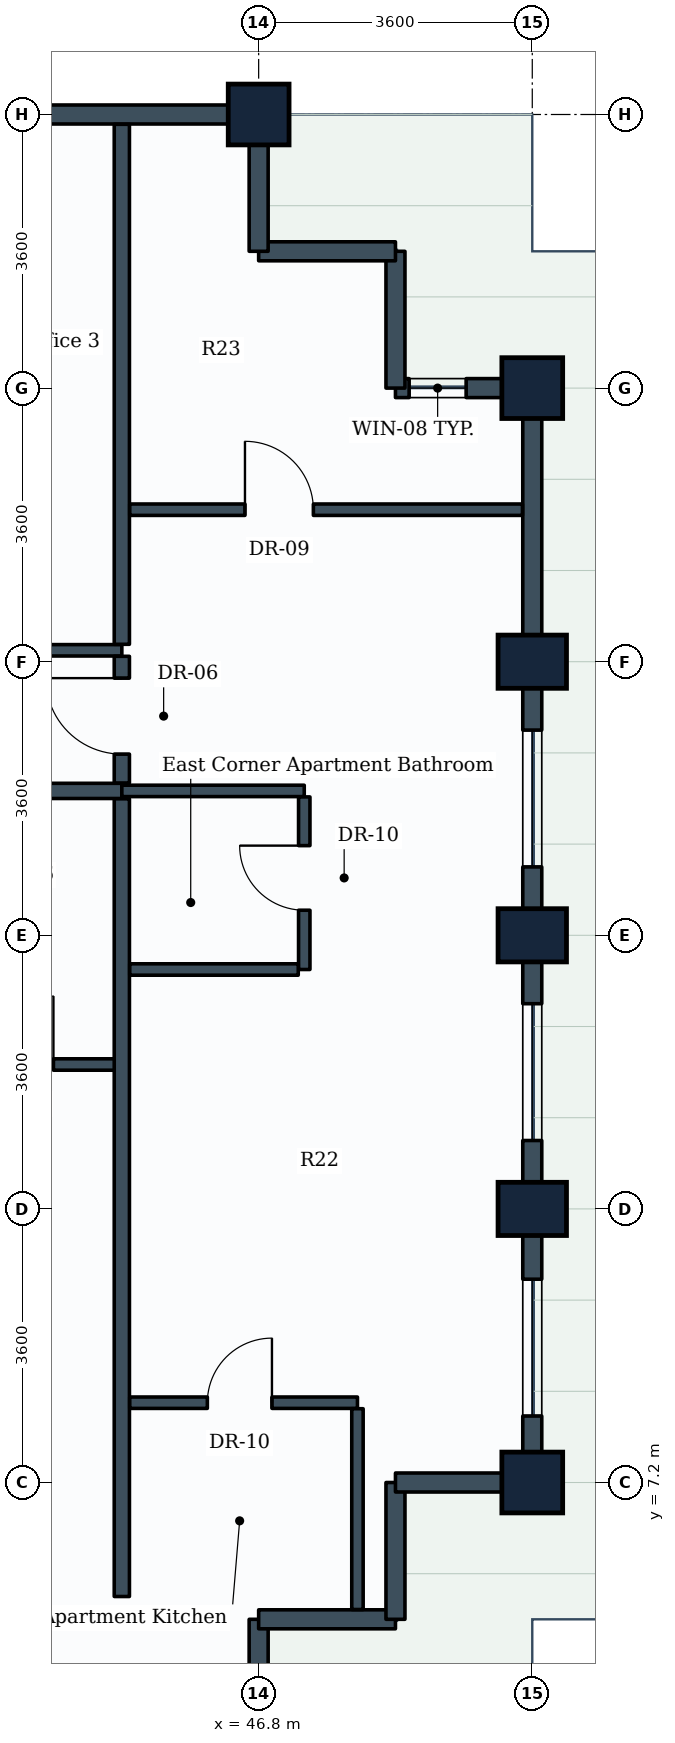
"""IFC4 building model, lengths in metres.
Left out: names, types, materials, properties, quantities, classifications, styles, units other than length and angle.
Written with IfcOpenShell. Run it as: python <this file> out.ifc"""

import sys

from ifc_helpers import new_model, si_unit, direction, frame, frame_2d, origin, origin_2d, place, context, subcontext, project, spatial, rectangle, extrude, element, fill, save


model = new_model("IFC4")
c1 = context("Model", 3, precision=1e-05, world=origin(), true_north=direction((0.0, 1.0)))
c2 = subcontext(c1, "Body", "Model", "MODEL_VIEW")
j1 = project(units=[si_unit("LENGTHUNIT", "METRE"), si_unit("PLANEANGLEUNIT", "RADIAN")], contexts=[c1])
p1 = place(None, origin())
s1 = spatial("IfcSite", under=j1, at=p1, CompositionType="ELEMENT")
p2 = place(p1, origin())
s2 = spatial("IfcBuilding", under=s1, at=p2, CompositionType="ELEMENT")
p3 = place(p2, frame((0.0, 0.0, 174.8)))
s3 = spatial("IfcBuildingStorey", under=s2, at=p3, CompositionType="ELEMENT", Elevation=174.8)
for number, where, z_axis, x_axis in (
    (1, (46.8, 25.2, 0.0), (0.0, 0.0, 1.0), (1.0, 0.0, 0.0)),
    (2, (50.4, 7.2, 0.0), (0.0, 0.0, 1.0), (1.0, 0.0, 0.0)),
):
    element("IfcColumn", number, at=place(p3, frame(where, z_axis=z_axis, x_axis=x_axis)), inside=s3, PredefinedType="COLUMN", context=c2, shape_type="SweptSolid", body=[
        extrude(rectangle(XDim=0.8, YDim=0.8, at=origin_2d()), origin(), (0.0, 0.0, 1.0), 3.8),
    ])
for number, where, z_axis, x_axis in (
    (3, (50.4, 10.8, 0.0), (0.0, 0.0, 1.0), (0.0, 1.0, 0.0)),
    (4, (50.4, 14.4, 0.0), (0.0, 0.0, 1.0), (0.0, 1.0, 0.0)),
    (5, (50.4, 18.0, 0.0), (0.0, 0.0, 1.0), (0.0, 1.0, 0.0)),
):
    element("IfcColumn", number, at=place(p3, frame(where, z_axis=z_axis, x_axis=x_axis)), inside=s3, PredefinedType="COLUMN", context=c2, shape_type="SweptSolid", body=[
        extrude(rectangle(XDim=0.7, YDim=0.9, at=origin_2d()), origin(), (0.0, 0.0, 1.0), 3.8),
    ])
p4 = place(p3, frame((50.4, 21.6, 0.0), z_axis=(0.0, 0.0, 1.0), x_axis=(0.0, 1.0, 0.0)))
e6 = element("IfcColumn", 6, at=p4, inside=s3, PredefinedType="COLUMN", context=c2, shape_type="SweptSolid", body=[
    extrude(rectangle(XDim=0.8, YDim=0.8, at=origin_2d()), origin(), (0.0, 0.0, 1.0), 3.8),
])
p5 = place(p3, frame((46.8, 5.4, 0.0), z_axis=(0.0, 0.0, 1.0), x_axis=(0.0, -1.0, 0.0)))
e7 = element("IfcWall", 7, at=p5, inside=s3, PredefinedType="STANDARD", context=c2, shape_type="SweptSolid", body=[
    extrude(rectangle(XDim=1.8, YDim=0.25, at=frame_2d((0.9, 0.0))), origin(), (0.0, 0.0, 1.0), 2.93),
])
for number, where, z_axis, x_axis in (
    (8, (48.6, 5.4, 0.0), (0.0, 0.0, 1.0), (-1.0, 0.0, 0.0)),
    (9, (48.6, 7.2, 0.0), (0.0, 0.0, 1.0), (0.0, -1.0, 0.0)),
):
    element("IfcWall", number, at=place(p3, frame(where, z_axis=z_axis, x_axis=x_axis)), inside=s3, PredefinedType="STANDARD", context=c2, shape_type="SweptSolid", body=[
        extrude(rectangle(XDim=1.8, YDim=0.25, at=frame_2d((0.9, 0.0))), origin(), (0.0, 0.0, 1.0), 3.535),
    ])
p6 = place(p3, frame((50.4, 7.2, 0.0), z_axis=(0.0, 0.0, 1.0), x_axis=(-1.0, 0.0, 0.0)))
e10 = element("IfcWall", 10, at=p6, inside=s3, PredefinedType="STANDARD", context=c2, shape_type="SweptSolid", body=[
    extrude(rectangle(XDim=1.8, YDim=0.25, at=frame_2d((0.9, 0.0))), origin(), (0.0, 0.0, 1.0), 2.93),
])
p7 = place(p3, frame((50.4, 10.8, 0.0), z_axis=(0.0, 0.0, 1.0), x_axis=(0.0, -1.0, 0.0)))
e11 = element("IfcWall", 11, at=p7, inside=s3, PredefinedType="STANDARD", context=c2, shape_type="SweptSolid", body=[
    extrude(rectangle(XDim=3.6, YDim=0.25, at=frame_2d((1.8, 0.0))), origin(), (0.0, 0.0, 1.0), 2.93),
])
p8 = place(p7, frame((0.925, 0.0, 0.85)))
e12 = element("IfcOpeningElement", 12, at=p8, cuts=e11, PredefinedType="OPENING", context=c2, shape_type="SweptSolid", body=[
    extrude(rectangle(XDim=1.8, YDim=1.35, at=frame_2d((0.9, 0.675))), frame((0.0, 0.135, 0.0), z_axis=(0.0, -1.0, 0.0), x_axis=(1.0, 0.0, 0.0)), (0.0, 0.0, 1.0), 0.27),
])
p9 = place(p3, frame((50.4, 14.4, 0.0), z_axis=(0.0, 0.0, 1.0), x_axis=(0.0, -1.0, 0.0)))
e13 = element("IfcWall", 13, at=p9, inside=s3, PredefinedType="STANDARD", context=c2, shape_type="SweptSolid", body=[
    extrude(rectangle(XDim=3.6, YDim=0.25, at=frame_2d((1.8, 0.0))), origin(), (0.0, 0.0, 1.0), 2.93),
])
p10 = place(p9, frame((0.9, 0.0, 0.85)))
e14 = element("IfcOpeningElement", 14, at=p10, cuts=e13, PredefinedType="OPENING", context=c2, shape_type="SweptSolid", body=[
    extrude(rectangle(XDim=1.8, YDim=1.35, at=frame_2d((0.9, 0.675))), frame((0.0, 0.135, 0.0), z_axis=(0.0, -1.0, 0.0), x_axis=(1.0, 0.0, 0.0)), (0.0, 0.0, 1.0), 0.27),
])
p11 = place(p3, frame((50.4, 18.0, 0.0), z_axis=(0.0, 0.0, 1.0), x_axis=(0.0, -1.0, 0.0)))
e15 = element("IfcWall", 15, at=p11, inside=s3, PredefinedType="STANDARD", context=c2, shape_type="SweptSolid", body=[
    extrude(rectangle(XDim=3.6, YDim=0.25, at=frame_2d((1.8, 0.0))), origin(), (0.0, 0.0, 1.0), 2.93),
])
p12 = place(p11, frame((0.9, 0.0, 0.85)))
e16 = element("IfcOpeningElement", 16, at=p12, cuts=e15, PredefinedType="OPENING", context=c2, shape_type="SweptSolid", body=[
    extrude(rectangle(XDim=1.8, YDim=1.35, at=frame_2d((0.9, 0.675))), frame((0.0, 0.135, 0.0), z_axis=(0.0, -1.0, 0.0), x_axis=(1.0, 0.0, 0.0)), (0.0, 0.0, 1.0), 0.27),
])
p13 = place(p3, frame((50.4, 21.6, 0.0), z_axis=(0.0, 0.0, 1.0), x_axis=(0.0, -1.0, 0.0)))
e17 = element("IfcWall", 17, at=p13, inside=s3, PredefinedType="STANDARD", context=c2, shape_type="SweptSolid", body=[
    extrude(rectangle(XDim=3.6, YDim=0.25, at=frame_2d((1.8, 0.0))), origin(), (0.0, 0.0, 1.0), 2.93),
])
p14 = place(p3, frame((48.6, 21.6, 0.0), z_axis=(0.0, 0.0, 1.0), x_axis=(1.0, 0.0, 0.0)))
e18 = element("IfcWall", 18, at=p14, inside=s3, PredefinedType="STANDARD", context=c2, shape_type="SweptSolid", body=[
    extrude(rectangle(XDim=1.8, YDim=0.25, at=frame_2d((0.9, 0.0))), origin(), (0.0, 0.0, 1.0), 2.93),
])
p15 = place(p14, frame((0.18, 0.0, 0.85)))
e19 = element("IfcOpeningElement", 19, at=p15, cuts=e18, PredefinedType="OPENING", context=c2, shape_type="SweptSolid", body=[
    extrude(rectangle(XDim=0.75, YDim=1.05, at=frame_2d((0.375, 0.525))), frame((0.0, 0.135, 0.0), z_axis=(0.0, -1.0, 0.0), x_axis=(1.0, 0.0, 0.0)), (0.0, 0.0, 1.0), 0.27),
])
p16 = place(p3, frame((48.6, 23.4, 0.0), z_axis=(0.0, 0.0, 1.0), x_axis=(0.0, -1.0, 0.0)))
e20 = element("IfcWall", 20, at=p16, inside=s3, PredefinedType="STANDARD", context=c2, shape_type="SweptSolid", body=[
    extrude(rectangle(XDim=1.8, YDim=0.25, at=frame_2d((0.9, 0.0))), origin(), (0.0, 0.0, 1.0), 3.535),
])
p17 = place(p3, frame((46.8, 23.4, 0.0), z_axis=(0.0, 0.0, 1.0), x_axis=(1.0, 0.0, 0.0)))
e21 = element("IfcWall", 21, at=p17, inside=s3, PredefinedType="STANDARD", context=c2, shape_type="SweptSolid", body=[
    extrude(rectangle(XDim=1.8, YDim=0.25, at=frame_2d((0.9, 0.0))), origin(), (0.0, 0.0, 1.0), 3.535),
])
p18 = place(p3, frame((46.8, 25.2, 0.0), z_axis=(0.0, 0.0, 1.0), x_axis=(0.0, -1.0, 0.0)))
e22 = element("IfcWall", 22, at=p18, inside=s3, PredefinedType="STANDARD", context=c2, shape_type="SweptSolid", body=[
    extrude(rectangle(XDim=1.8, YDim=0.25, at=frame_2d((0.9, 0.0))), origin(), (0.0, 0.0, 1.0), 2.93),
])
p19 = place(p3, frame((43.2, 25.2, 0.0), z_axis=(0.0, 0.0, 1.0), x_axis=(1.0, 0.0, 0.0)))
e23 = element("IfcWall", 23, at=p19, inside=s3, PredefinedType="STANDARD", context=c2, shape_type="SweptSolid", body=[
    extrude(rectangle(XDim=3.6, YDim=0.25, at=frame_2d((1.8, 0.0))), origin(), (0.0, 0.0, 1.0), 2.93),
])
p20 = place(p3, frame((41.68, 16.3, 0.0), z_axis=(0.0, 0.0, 1.0), x_axis=(1.0, 0.0, 0.0)))
e24 = element("IfcWall", 24, at=p20, inside=s3, PredefinedType="PARTITIONING", context=c2, shape_type="SweptSolid", body=[
    extrude(rectangle(XDim=3.32, YDim=0.2, at=frame_2d((1.66, 0.0))), origin(), (0.0, 0.0, 1.0), 3.18),
])
p21 = place(p20, frame((1.199, 0.0, 0.0)))
e25 = element("IfcOpeningElement", 25, at=p21, cuts=e24, PredefinedType="OPENING", context=c2, shape_type="SweptSolid", body=[
    extrude(rectangle(XDim=1.0, YDim=2.1, at=frame_2d((0.5, 1.05))), frame((0.0, 0.11, 0.0), z_axis=(0.0, -1.0, 0.0), x_axis=(1.0, 0.0, 0.0)), (0.0, 0.0, 1.0), 0.22),
])
p22 = place(p3, frame((42.38, 12.7, 0.0), z_axis=(0.0, 0.0, 1.0), x_axis=(1.0, 0.0, 0.0)))
e26 = element("IfcWall", 26, at=p22, inside=s3, PredefinedType="PARTITIONING", context=c2, shape_type="SweptSolid", body=[
    extrude(rectangle(XDim=2.62, YDim=0.15, at=frame_2d((1.31, 0.0))), origin(), (0.0, 0.0, 1.0), 3.18),
])
p23 = place(p22, frame((0.82, 0.0, 0.0)))
e27 = element("IfcOpeningElement", 27, at=p23, cuts=e26, PredefinedType="OPENING", context=c2, shape_type="SweptSolid", body=[
    extrude(rectangle(XDim=0.9, YDim=2.1, at=frame_2d((0.45, 1.05))), frame((0.0, 0.085, 0.0), z_axis=(0.0, -1.0, 0.0), x_axis=(1.0, 0.0, 0.0)), (0.0, 0.0, 1.0), 0.17),
])
p24 = place(p3, frame((39.0, 18.15, 0.0), z_axis=(0.0, 0.0, 1.0), x_axis=(1.0, 0.0, 0.0)))
e28 = element("IfcWall", 28, at=p24, inside=s3, PredefinedType="PARTITIONING", context=c2, shape_type="SweptSolid", body=[
    extrude(rectangle(XDim=6.0, YDim=0.15, at=frame_2d((3.0, 0.0))), origin(), (0.0, 0.0, 1.0), 3.17),
])
p25 = place(p24, frame((2.5, 0.0, 0.0)))
e29 = element("IfcOpeningElement", 29, at=p25, cuts=e28, PredefinedType="OPENING", context=c2, shape_type="SweptSolid", body=[
    extrude(rectangle(XDim=1.0, YDim=2.1, at=frame_2d((0.5, 1.05))), frame((0.0, 0.085, 0.0), z_axis=(0.0, -1.0, 0.0), x_axis=(1.0, 0.0, 0.0)), (0.0, 0.0, 1.0), 0.17),
])
p26 = place(p3, frame((45.0, 5.7, 0.0), z_axis=(0.0, 0.0, 1.0), x_axis=(0.0, 1.0, 0.0)))
e30 = element("IfcWall", 30, at=p26, inside=s3, PredefinedType="PARTITIONING", context=c2, shape_type="SweptSolid", body=[
    extrude(rectangle(XDim=10.496, YDim=0.2, at=frame_2d((5.248, 0.0))), origin(), (0.0, 0.0, 1.0), 3.17),
])
p27 = place(p3, frame((45.0, 18.229, 0.0), z_axis=(0.0, 0.0, 1.0), x_axis=(0.0, 1.0, 0.0)))
e31 = element("IfcWall", 31, at=p27, inside=s3, PredefinedType="PARTITIONING", context=c2, shape_type="SweptSolid", body=[
    extrude(rectangle(XDim=6.842, YDim=0.2, at=frame_2d((3.421, 0.0))), origin(), (0.0, 0.0, 1.0), 2.93),
])
p28 = place(p3, frame((45.0, 16.404, 0.0), z_axis=(0.0, 0.0, 1.0), x_axis=(0.0, 1.0, 0.0)))
e32 = element("IfcWall", 32, at=p28, inside=s3, PredefinedType="PARTITIONING", context=c2, shape_type="SweptSolid", body=[
    extrude(rectangle(XDim=1.667, YDim=0.2, at=frame_2d((0.833, 0.0))), origin(), (0.0, 0.0, 1.0), 3.535),
])
p29 = place(p28, frame((0.38, 0.0, 0.0)))
e33 = element("IfcOpeningElement", 33, at=p29, cuts=e32, PredefinedType="OPENING", context=c2, shape_type="SweptSolid", body=[
    extrude(rectangle(XDim=1.0, YDim=2.1, at=frame_2d((0.5, 1.05))), frame((0.0, 0.11, 0.0), z_axis=(0.0, -1.0, 0.0), x_axis=(1.0, 0.0, 0.0)), (0.0, 0.0, 1.0), 0.22),
])
p30 = place(p3, frame((45.0, 16.3, 0.0), z_axis=(0.0, 0.0, 1.0), x_axis=(1.0, 0.0, 0.0)))
e34 = element("IfcWall", 34, at=p30, inside=s3, PredefinedType="PARTITIONING", context=c2, shape_type="SweptSolid", body=[
    extrude(rectangle(XDim=2.4, YDim=0.15, at=frame_2d((1.2, 0.0))), origin(), (0.0, 0.0, 1.0), 3.535),
])
p31 = place(p3, frame((47.4, 13.95, 0.0), z_axis=(0.0, 0.0, 1.0), x_axis=(0.0, 1.0, 0.0)))
e35 = element("IfcWall", 35, at=p31, inside=s3, PredefinedType="PARTITIONING", context=c2, shape_type="SweptSolid", body=[
    extrude(rectangle(XDim=2.271, YDim=0.15, at=frame_2d((1.135, 0.0))), origin(), (0.0, 0.0, 1.0), 3.17),
])
p32 = place(p31, frame((0.78, 0.0, 0.0)))
e36 = element("IfcOpeningElement", 36, at=p32, cuts=e35, PredefinedType="OPENING", context=c2, shape_type="SweptSolid", body=[
    extrude(rectangle(XDim=0.85, YDim=2.1, at=frame_2d((0.425, 1.05))), frame((0.0, 0.085, 0.0), z_axis=(0.0, -1.0, 0.0), x_axis=(1.0, 0.0, 0.0)), (0.0, 0.0, 1.0), 0.17),
])
p33 = place(p3, frame((45.104, 13.95, 0.0), z_axis=(0.0, 0.0, 1.0), x_axis=(1.0, 0.0, 0.0)))
e37 = element("IfcWall", 37, at=p33, inside=s3, PredefinedType="PARTITIONING", context=c2, shape_type="SweptSolid", body=[
    extrude(rectangle(XDim=2.217, YDim=0.15, at=frame_2d((1.108, 0.0))), origin(), (0.0, 0.0, 1.0), 3.535),
])
p34 = place(p3, frame((45.104, 20.0, 0.0), z_axis=(0.0, 0.0, 1.0), x_axis=(1.0, 0.0, 0.0)))
e38 = element("IfcWall", 38, at=p34, inside=s3, PredefinedType="PARTITIONING", context=c2, shape_type="SweptSolid", body=[
    extrude(rectangle(XDim=5.167, YDim=0.15, at=frame_2d((2.583, 0.0))), origin(), (0.0, 0.0, 1.0), 2.93),
])
p35 = place(p34, frame((1.516, 0.0, 0.0)))
e39 = element("IfcOpeningElement", 39, at=p35, cuts=e38, PredefinedType="OPENING", context=c2, shape_type="SweptSolid", body=[
    extrude(rectangle(XDim=0.9, YDim=2.1, at=frame_2d((0.45, 1.05))), frame((0.0, 0.085, 0.0), z_axis=(0.0, -1.0, 0.0), x_axis=(1.0, 0.0, 0.0)), (0.0, 0.0, 1.0), 0.17),
])
p36 = place(p3, frame((45.104, 8.25, 0.0), z_axis=(0.0, 0.0, 1.0), x_axis=(1.0, 0.0, 0.0)))
e40 = element("IfcWall", 40, at=p36, inside=s3, PredefinedType="PARTITIONING", context=c2, shape_type="SweptSolid", body=[
    extrude(rectangle(XDim=2.996, YDim=0.15, at=frame_2d((1.498, 0.0))), origin(), (0.0, 0.0, 1.0), 3.535),
])
p37 = place(p36, frame((1.021, 0.0, 0.0)))
e41 = element("IfcOpeningElement", 41, at=p37, cuts=e40, PredefinedType="OPENING", context=c2, shape_type="SweptSolid", body=[
    extrude(rectangle(XDim=0.85, YDim=2.1, at=frame_2d((0.425, 1.05))), frame((0.0, 0.085, 0.0), z_axis=(0.0, -1.0, 0.0), x_axis=(1.0, 0.0, 0.0)), (0.0, 0.0, 1.0), 0.17),
])
p38 = place(p3, frame((48.1, 5.529, 0.0), z_axis=(0.0, 0.0, 1.0), x_axis=(0.0, 1.0, 0.0)))
e42 = element("IfcWall", 42, at=p38, inside=s3, PredefinedType="PARTITIONING", context=c2, shape_type="SweptSolid", body=[
    extrude(rectangle(XDim=2.642, YDim=0.15, at=frame_2d((1.321, 0.0))), origin(), (0.0, 0.0, 1.0), 3.535),
])
p39 = place(p8, origin())
e43 = element("IfcWindow", 43, at=p39, inside=s3, PartitioningType="SINGLE_PANEL", PredefinedType="WINDOW", context=c2, shape_type="SweptSolid", body=[
    extrude(rectangle(XDim=1.8, YDim=1.35, at=frame_2d((0.9, 0.675))), frame((0.0, 0.03, 0.0), z_axis=(0.0, -1.0, 0.0), x_axis=(1.0, 0.0, 0.0)), (0.0, 0.0, 1.0), 0.06),
])
fill(e12, e43)
p40 = place(p10, origin())
e44 = element("IfcWindow", 44, at=p40, inside=s3, PartitioningType="SINGLE_PANEL", PredefinedType="WINDOW", context=c2, shape_type="SweptSolid", body=[
    extrude(rectangle(XDim=1.8, YDim=1.35, at=frame_2d((0.9, 0.675))), frame((0.0, 0.03, 0.0), z_axis=(0.0, -1.0, 0.0), x_axis=(1.0, 0.0, 0.0)), (0.0, 0.0, 1.0), 0.06),
])
fill(e14, e44)
p41 = place(p12, origin())
e45 = element("IfcWindow", 45, at=p41, inside=s3, PartitioningType="SINGLE_PANEL", PredefinedType="WINDOW", context=c2, shape_type="SweptSolid", body=[
    extrude(rectangle(XDim=1.8, YDim=1.35, at=frame_2d((0.9, 0.675))), frame((0.0, 0.03, 0.0), z_axis=(0.0, -1.0, 0.0), x_axis=(1.0, 0.0, 0.0)), (0.0, 0.0, 1.0), 0.06),
])
fill(e16, e45)
p42 = place(p23, origin())
e46 = element("IfcDoor", 46, at=p42, inside=s3, OperationType="SINGLE_SWING_RIGHT", PredefinedType="DOOR", context=c2, shape_type="SweptSolid", body=[
    extrude(rectangle(XDim=0.9, YDim=2.1, at=frame_2d((0.45, 1.05))), frame((0.0, 0.025, 0.0), z_axis=(0.0, -1.0, 0.0), x_axis=(1.0, 0.0, 0.0)), (0.0, 0.0, 1.0), 0.05),
])
fill(e27, e46)
p43 = place(p29, origin())
e47 = element("IfcDoor", 47, at=p43, inside=s3, OperationType="SINGLE_SWING_RIGHT", PredefinedType="DOOR", context=c2, shape_type="SweptSolid", body=[
    extrude(rectangle(XDim=1.0, YDim=2.1, at=frame_2d((0.5, 1.05))), frame((0.0, 0.025, 0.0), z_axis=(0.0, -1.0, 0.0), x_axis=(1.0, 0.0, 0.0)), (0.0, 0.0, 1.0), 0.05),
])
fill(e33, e47)
p44 = place(p32, origin())
e48 = element("IfcDoor", 48, at=p44, inside=s3, OperationType="SINGLE_SWING_RIGHT", PredefinedType="DOOR", context=c2, shape_type="SweptSolid", body=[
    extrude(rectangle(XDim=0.85, YDim=2.1, at=frame_2d((0.425, 1.05))), frame((0.0, 0.025, 0.0), z_axis=(0.0, -1.0, 0.0), x_axis=(1.0, 0.0, 0.0)), (0.0, 0.0, 1.0), 0.05),
])
fill(e36, e48)
p45 = place(p35, origin())
e49 = element("IfcDoor", 49, at=p45, inside=s3, OperationType="SINGLE_SWING_LEFT", PredefinedType="DOOR", context=c2, shape_type="SweptSolid", body=[
    extrude(rectangle(XDim=0.9, YDim=2.1, at=frame_2d((0.45, 1.05))), frame((0.0, 0.025, 0.0), z_axis=(0.0, -1.0, 0.0), x_axis=(1.0, 0.0, 0.0)), (0.0, 0.0, 1.0), 0.05),
])
fill(e39, e49)
p46 = place(p37, origin())
e50 = element("IfcDoor", 50, at=p46, inside=s3, OperationType="SINGLE_SWING_RIGHT", PredefinedType="DOOR", context=c2, shape_type="SweptSolid", body=[
    extrude(rectangle(XDim=0.85, YDim=2.1, at=frame_2d((0.425, 1.05))), frame((0.0, 0.025, 0.0), z_axis=(0.0, -1.0, 0.0), x_axis=(1.0, 0.0, 0.0)), (0.0, 0.0, 1.0), 0.05),
])
fill(e41, e50)
p47 = place(p15, origin())
e51 = element("IfcWindow", 51, at=p47, inside=s3, PartitioningType="SINGLE_PANEL", PredefinedType="WINDOW", context=c2, shape_type="SweptSolid", body=[
    extrude(rectangle(XDim=0.75, YDim=1.05, at=frame_2d((0.375, 0.525))), frame((0.0, 0.03, 0.0), z_axis=(0.0, -1.0, 0.0), x_axis=(1.0, 0.0, 0.0)), (0.0, 0.0, 1.0), 0.06),
])
fill(e19, e51)
save(model, sys.argv[1])
